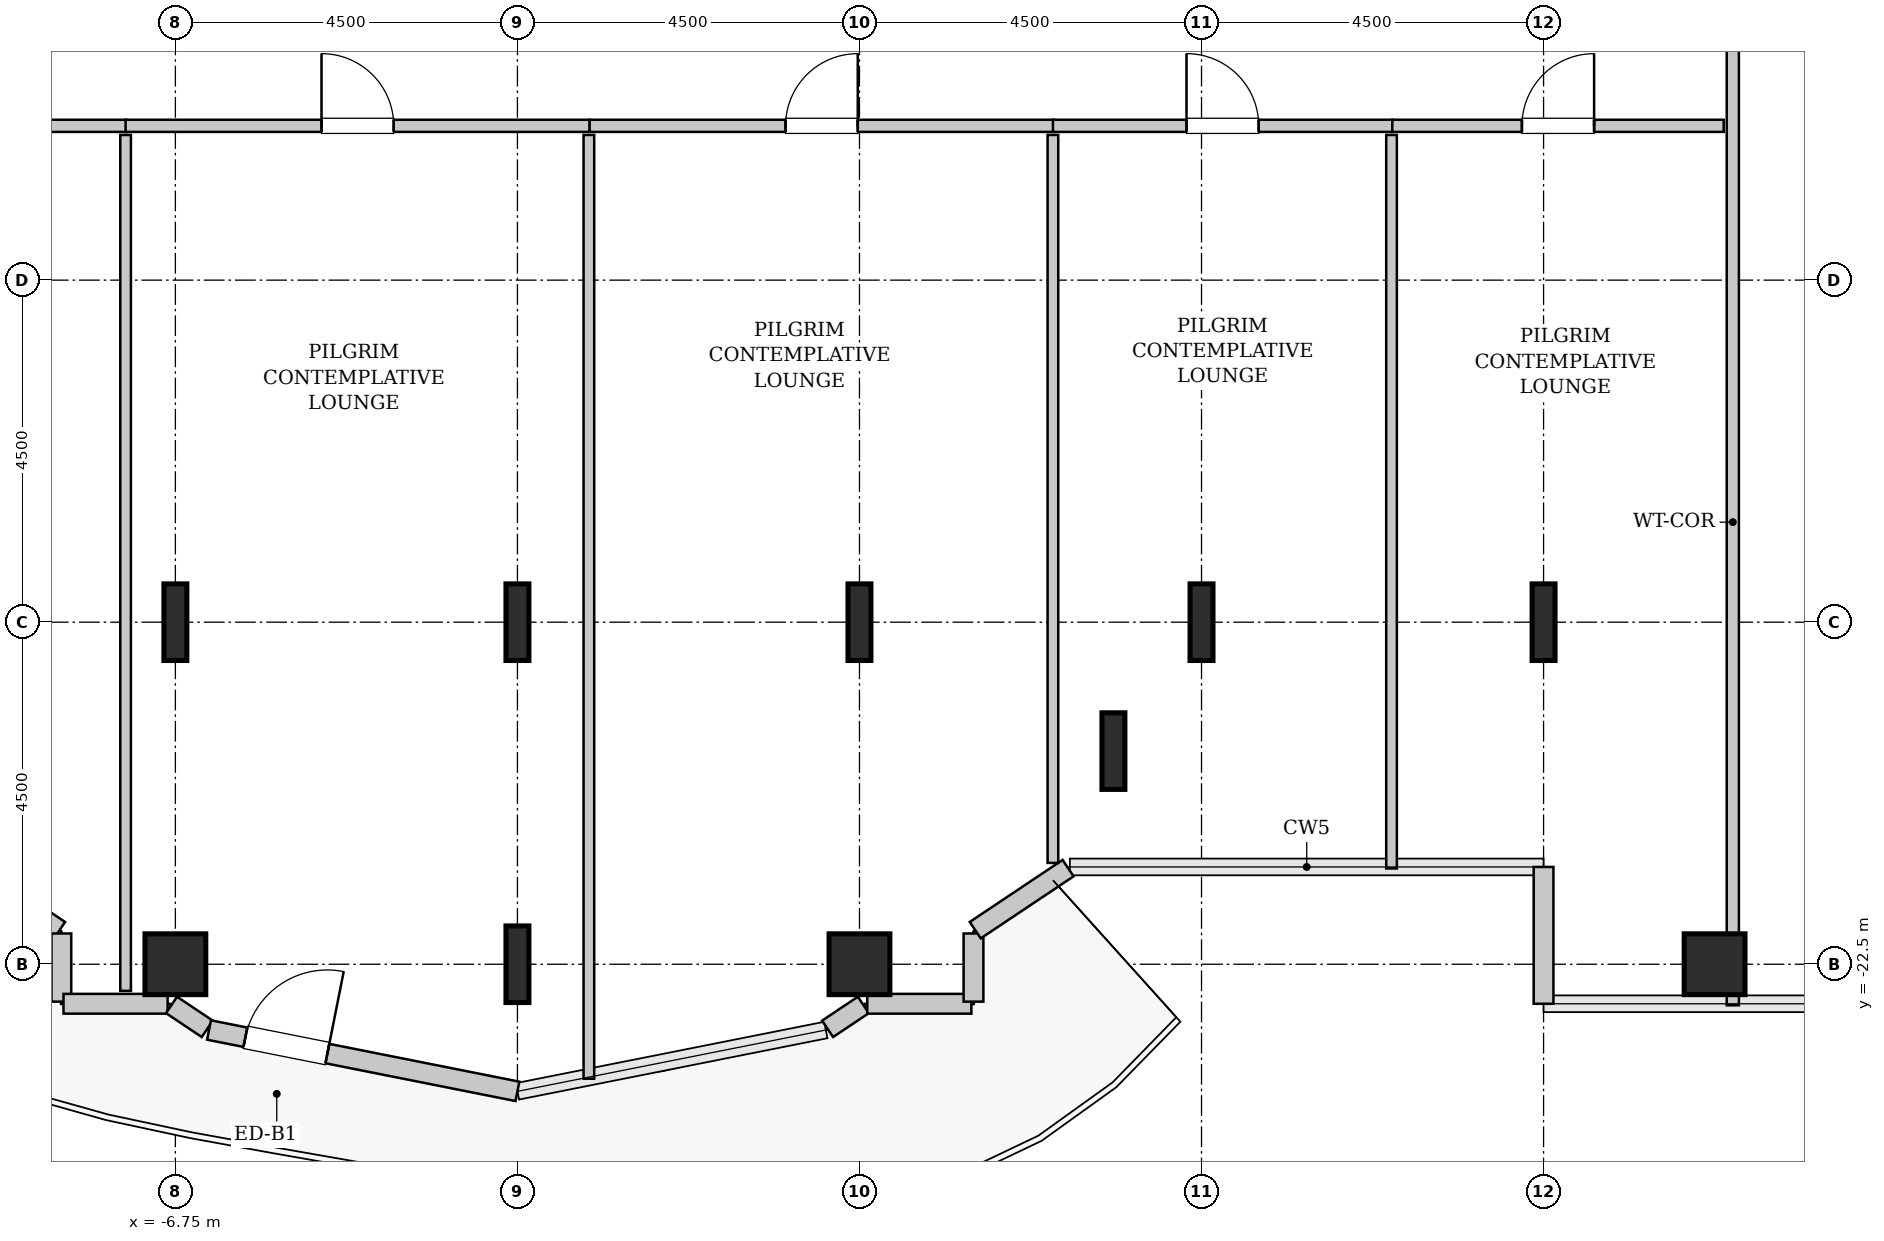
"""IFC4 building model, lengths in metres.
Left out: names, types, materials, properties, quantities, classifications, styles, units other than length and angle.
Written with IfcOpenShell. Run it as: python <this file> out.ifc"""

import sys

from ifc_helpers import new_model, si_unit, direction, frame, frame_2d, origin, origin_2d, place, context, subcontext, project, spatial, rectangle, hollow_rectangle, i_section, extrude, source, transform, mapped, element, fill, save


model = new_model("IFC4")
c1 = context("Model", 3, precision=1e-05, world=origin(), true_north=direction((0.0, 1.0)))
c2 = subcontext(c1, "Body", "Model", "MODEL_VIEW")
j1 = project(units=[si_unit("LENGTHUNIT", "METRE"), si_unit("PLANEANGLEUNIT", "RADIAN")], contexts=[c1])
p1 = place(None, origin())
s1 = spatial("IfcSite", under=j1, at=p1, CompositionType="ELEMENT")
p2 = place(p1, origin())
s2 = spatial("IfcBuilding", under=s1, at=p2, CompositionType="ELEMENT")
p3 = place(p2, frame((0.0, 0.0, 125.0)))
s3 = spatial("IfcBuildingStorey", under=s2, at=p3, CompositionType="ELEMENT", Elevation=125.0)
m1 = source(origin(), c2, "Body", "SweptSolid", [
    extrude(hollow_rectangle(XDim=0.8, YDim=0.8, WallThickness=0.04, InnerFilletRadius=0.04, OuterFilletRadius=0.08, at=origin_2d()), origin(), (0.0, 0.0, 1.0), 3.8),
])
p4 = place(p3, frame((-6.75, -22.5, 0.0), z_axis=(0.0, 0.0, 1.0), x_axis=(1.0, 0.0, 0.0)))
e1 = element("IfcColumn", 1, at=p4, inside=s3, PredefinedType="COLUMN", context=c2, shape_type="MappedRepresentation", body=[
    mapped(m1, transform((0.0, 0.0, 0.0), x_axis=(1.0, 0.0, 0.0), y_axis=(0.0, 1.0, 0.0), z_axis=(0.0, 0.0, 1.0), scale=1.0)),
])
m2 = source(origin(), c2, "Body", "SweptSolid", [
    extrude(i_section(OverallWidth=0.302, OverallDepth=1.008, WebThickness=0.021, FlangeThickness=0.04, FilletRadius=0.03, at=origin_2d()), origin(), (0.0, 0.0, 1.0), 3.8),
])
for number, where, z_axis, x_axis in (
    (2, (-6.75, -18.0, 0.0), (0.0, 0.0, 1.0), (1.0, 0.0, 0.0)),
    (3, (-2.25, -22.5, 0.0), (0.0, 0.0, 1.0), (1.0, 0.0, 0.0)),
    (4, (-2.25, -18.0, 0.0), (0.0, 0.0, 1.0), (1.0, 0.0, 0.0)),
):
    element("IfcColumn", number, at=place(p3, frame(where, z_axis=z_axis, x_axis=x_axis)), inside=s3, PredefinedType="COLUMN", context=c2, shape_type="MappedRepresentation", body=[
        mapped(m2, transform((0.0, 0.0, 0.0), x_axis=(1.0, 0.0, 0.0), y_axis=(0.0, 1.0, 0.0), z_axis=(0.0, 0.0, 1.0), scale=1.0)),
    ])
p5 = place(p3, frame((2.25, -22.5, 0.0), z_axis=(0.0, 0.0, 1.0), x_axis=(1.0, 0.0, 0.0)))
e5 = element("IfcColumn", 5, at=p5, inside=s3, PredefinedType="COLUMN", context=c2, shape_type="MappedRepresentation", body=[
    mapped(m1, transform((0.0, 0.0, 0.0), x_axis=(1.0, 0.0, 0.0), y_axis=(0.0, 1.0, 0.0), z_axis=(0.0, 0.0, 1.0), scale=1.0)),
])
for number, where, z_axis, x_axis in (
    (6, (2.25, -18.0, 0.0), (0.0, 0.0, 1.0), (1.0, 0.0, 0.0)),
    (7, (5.591, -19.696, 0.0), (0.0, 0.0, 1.0), (1.0, 0.0, 0.0)),
    (8, (6.75, -18.0, 0.0), (0.0, 0.0, 1.0), (1.0, 0.0, 0.0)),
    (9, (11.25, -18.0, 0.0), (0.0, 0.0, 1.0), (1.0, 0.0, 0.0)),
):
    element("IfcColumn", number, at=place(p3, frame(where, z_axis=z_axis, x_axis=x_axis)), inside=s3, PredefinedType="COLUMN", context=c2, shape_type="MappedRepresentation", body=[
        mapped(m2, transform((0.0, 0.0, 0.0), x_axis=(1.0, 0.0, 0.0), y_axis=(0.0, 1.0, 0.0), z_axis=(0.0, 0.0, 1.0), scale=1.0)),
    ])
p6 = place(p3, frame((13.5, -22.5, 0.0), z_axis=(0.0, 0.0, 1.0), x_axis=(1.0, 0.0, 0.0)))
e10 = element("IfcColumn", 10, at=p6, inside=s3, PredefinedType="COLUMN", context=c2, shape_type="MappedRepresentation", body=[
    mapped(m1, transform((0.0, 0.0, 0.0), x_axis=(1.0, 0.0, 0.0), y_axis=(0.0, 1.0, 0.0), z_axis=(0.0, 0.0, 1.0), scale=1.0)),
])
m3 = source(origin(), c2, "Body", "SweptSolid", [
    extrude(rectangle(XDim=1.8, YDim=0.26, at=frame_2d((0.9, 0.0))), origin(), (0.0, 0.0, 1.0), 3.55),
])
p7 = place(p3, frame((11.25, -21.22, 0.0), z_axis=(0.0, 0.0, 1.0), x_axis=(0.0, -1.0, 0.0)))
e11 = element("IfcWall", 11, at=p7, inside=s3, PredefinedType="SOLIDWALL", context=c2, shape_type="MappedRepresentation", body=[
    mapped(m3, transform((0.0, 0.0, 0.0), x_axis=(1.0, 0.0, 0.0), y_axis=(0.0, 1.0, 0.0), z_axis=(0.0, 0.0, 1.0), scale=1.0)),
])
m4 = source(origin(), c2, "Body", "SweptSolid", [
    extrude(rectangle(XDim=1.469, YDim=0.26, at=frame_2d((0.734, 0.0))), origin(), (0.0, 0.0, 1.0), 3.55),
])
p8 = place(p3, frame((-9.495, -21.236, 0.0), z_axis=(0.0, 0.0, 1.0), x_axis=(0.831461760506, -0.555581983884, 0.0)))
e12 = element("IfcWall", 12, at=p8, inside=s3, PredefinedType="SOLIDWALL", context=c2, shape_type="MappedRepresentation", body=[
    mapped(m4, transform((0.0, 0.0, 0.0), x_axis=(1.0, 0.0, 0.0), y_axis=(0.0, 1.0, 0.0), z_axis=(0.0, 0.0, 1.0), scale=1.0)),
])
m5 = source(origin(), c2, "Body", "SweptSolid", [
    extrude(rectangle(XDim=0.897, YDim=0.26, at=frame_2d((0.448, 0.0))), origin(), (0.0, 0.0, 1.0), 3.55),
])
p9 = place(p3, frame((-8.25, -22.095, 0.0), z_axis=(0.0, 0.0, 1.0), x_axis=(0.0, -1.0, 0.0)))
e13 = element("IfcWall", 13, at=p9, inside=s3, PredefinedType="SOLIDWALL", context=c2, shape_type="MappedRepresentation", body=[
    mapped(m5, transform((0.0, 0.0, 0.0), x_axis=(1.0, 0.0, 0.0), y_axis=(0.0, 1.0, 0.0), z_axis=(0.0, 0.0, 1.0), scale=1.0)),
])
m6 = source(origin(), c2, "Body", "SweptSolid", [
    extrude(rectangle(XDim=1.37, YDim=0.26, at=frame_2d((0.685, 0.0))), origin(), (0.0, 0.0, 1.0), 3.55),
])
p10 = place(p3, frame((-8.222, -23.02, 0.0), z_axis=(0.0, 0.0, 1.0), x_axis=(1.0, 0.0, 0.0)))
e14 = element("IfcWall", 14, at=p10, inside=s3, PredefinedType="SOLIDWALL", context=c2, shape_type="MappedRepresentation", body=[
    mapped(m6, transform((0.0, 0.0, 0.0), x_axis=(1.0, 0.0, 0.0), y_axis=(0.0, 1.0, 0.0), z_axis=(0.0, 0.0, 1.0), scale=1.0)),
])
m7 = source(origin(), c2, "Body", "SweptSolid", [
    extrude(rectangle(XDim=0.565, YDim=0.26, at=frame_2d((0.283, 0.0))), origin(), (0.0, 0.0, 1.0), 3.55),
])
p11 = place(p3, frame((-6.801, -23.036, 0.0), z_axis=(0.0, 0.0, 1.0), x_axis=(0.831651492666, -0.555297933317, 0.0)))
e15 = element("IfcWall", 15, at=p11, inside=s3, PredefinedType="SOLIDWALL", context=c2, shape_type="MappedRepresentation", body=[
    mapped(m7, transform((0.0, 0.0, 0.0), x_axis=(1.0, 0.0, 0.0), y_axis=(0.0, 1.0, 0.0), z_axis=(0.0, 0.0, 1.0), scale=1.0)),
])
m8 = source(origin(), c2, "Body", "SweptSolid", [
    extrude(rectangle(XDim=4.137, YDim=0.26, at=frame_2d((2.068, 0.0))), origin(), (0.0, 0.0, 1.0), 3.55),
])
p12 = place(p3, frame((-6.307, -23.365, 0.0), z_axis=(0.0, 0.0, 1.0), x_axis=(0.980782170794, -0.195105954428, 0.0)))
e16 = element("IfcWall", 16, at=p12, inside=s3, PredefinedType="SOLIDWALL", context=c2, shape_type="MappedRepresentation", body=[
    mapped(m8, transform((0.0, 0.0, 0.0), x_axis=(1.0, 0.0, 0.0), y_axis=(0.0, 1.0, 0.0), z_axis=(0.0, 0.0, 1.0), scale=1.0)),
])
p13 = place(p12, frame((0.488, 0.0, 0.0)))
e17 = element("IfcOpeningElement", 17, at=p13, cuts=e16, PredefinedType="OPENING", context=c2, shape_type="SweptSolid", body=[
    extrude(rectangle(XDim=1.1, YDim=2.2, at=frame_2d((0.55, 1.1))), frame((0.0, 0.14, 0.0), z_axis=(0.0, -1.0, 0.0), x_axis=(1.0, 0.0, 0.0)), (0.0, 0.0, 1.0), 0.28),
])
p14 = place(p3, frame((1.831, -23.35, 0.0), z_axis=(0.0, 0.0, 1.0), x_axis=(0.831651492666, 0.555297933317, 0.0)))
e18 = element("IfcWall", 18, at=p14, inside=s3, PredefinedType="SOLIDWALL", context=c2, shape_type="MappedRepresentation", body=[
    mapped(m7, transform((0.0, 0.0, 0.0), x_axis=(1.0, 0.0, 0.0), y_axis=(0.0, 1.0, 0.0), z_axis=(0.0, 0.0, 1.0), scale=1.0)),
])
p15 = place(p3, frame((2.352, -23.02, 0.0), z_axis=(0.0, 0.0, 1.0), x_axis=(1.0, 0.0, 0.0)))
e19 = element("IfcWall", 19, at=p15, inside=s3, PredefinedType="SOLIDWALL", context=c2, shape_type="MappedRepresentation", body=[
    mapped(m6, transform((0.0, 0.0, 0.0), x_axis=(1.0, 0.0, 0.0), y_axis=(0.0, 1.0, 0.0), z_axis=(0.0, 0.0, 1.0), scale=1.0)),
])
p16 = place(p3, frame((3.75, -22.992, 0.0), z_axis=(0.0, 0.0, 1.0), x_axis=(0.0, 1.0, 0.0)))
e20 = element("IfcWall", 20, at=p16, inside=s3, PredefinedType="SOLIDWALL", context=c2, shape_type="MappedRepresentation", body=[
    mapped(m5, transform((0.0, 0.0, 0.0), x_axis=(1.0, 0.0, 0.0), y_axis=(0.0, 1.0, 0.0), z_axis=(0.0, 0.0, 1.0), scale=1.0)),
])
p17 = place(p3, frame((3.773, -22.052, 0.0), z_axis=(0.0, 0.0, 1.0), x_axis=(0.831461760506, 0.555581983884, 0.0)))
e21 = element("IfcWall", 21, at=p17, inside=s3, PredefinedType="SOLIDWALL", context=c2, shape_type="MappedRepresentation", body=[
    mapped(m4, transform((0.0, 0.0, 0.0), x_axis=(1.0, 0.0, 0.0), y_axis=(0.0, 1.0, 0.0), z_axis=(0.0, 0.0, 1.0), scale=1.0)),
])
m9 = source(origin(), c2, "Body", "SweptSolid", [
    extrude(rectangle(XDim=14.745, YDim=0.16, at=frame_2d((7.373, 0.0))), origin(), (0.0, 0.0, 1.0), 3.535),
])
p18 = place(p3, frame((13.74, -23.04, 0.0), z_axis=(0.0, 0.0, 1.0), x_axis=(0.0, 1.0, 0.0)))
e22 = element("IfcWall", 22, at=p18, inside=s3, PredefinedType="PARTITIONING", context=c2, shape_type="MappedRepresentation", body=[
    mapped(m9, transform((0.0, 0.0, 0.0), x_axis=(1.0, 0.0, 0.0), y_axis=(0.0, 1.0, 0.0), z_axis=(0.0, 0.0, 1.0), scale=1.0)),
])
p19 = place(p18, frame((12.663, 0.0, 0.0)))
e23 = element("IfcOpeningElement", 23, at=p19, cuts=e22, PredefinedType="OPENING", context=c2, shape_type="SweptSolid", body=[
    extrude(rectangle(XDim=0.95, YDim=2.1, at=frame_2d((0.475, 1.05))), frame((0.0, 0.09, 0.0), z_axis=(0.0, -1.0, 0.0), x_axis=(1.0, 0.0, 0.0)), (0.0, 0.0, 1.0), 0.18),
])
m10 = source(origin(), c2, "Body", "SweptSolid", [
    extrude(rectangle(XDim=6.225, YDim=0.16, at=frame_2d((3.113, 0.0))), origin(), (0.0, 0.0, 1.0), 3.535),
])
p20 = place(p3, frame((-13.62, -11.47, 0.0), z_axis=(0.0, 0.0, 1.0), x_axis=(1.0, 0.0, 0.0)))
e24 = element("IfcWall", 24, at=p20, inside=s3, PredefinedType="PARTITIONING", context=c2, shape_type="MappedRepresentation", body=[
    mapped(m10, transform((0.0, 0.0, 0.0), x_axis=(1.0, 0.0, 0.0), y_axis=(0.0, 1.0, 0.0), z_axis=(0.0, 0.0, 1.0), scale=1.0)),
])
p21 = place(p20, frame((2.637, 0.0, 0.0)))
e25 = element("IfcOpeningElement", 25, at=p21, cuts=e24, PredefinedType="OPENING", context=c2, shape_type="SweptSolid", body=[
    extrude(rectangle(XDim=0.95, YDim=2.1, at=frame_2d((0.475, 1.05))), frame((0.0, 0.09, 0.0), z_axis=(0.0, -1.0, 0.0), x_axis=(1.0, 0.0, 0.0)), (0.0, 0.0, 1.0), 0.18),
])
m11 = source(origin(), c2, "Body", "SweptSolid", [
    extrude(rectangle(XDim=11.26, YDim=0.14, at=frame_2d((5.63, 0.0))), origin(), (0.0, 0.0, 1.0), 3.535),
])
p22 = place(p3, frame((-7.405, -22.85, 0.0), z_axis=(0.0, 0.0, 1.0), x_axis=(0.0, 1.0, 0.0)))
e26 = element("IfcWall", 26, at=p22, inside=s3, PredefinedType="PARTITIONING", context=c2, shape_type="MappedRepresentation", body=[
    mapped(m11, transform((0.0, 0.0, 0.0), x_axis=(1.0, 0.0, 0.0), y_axis=(0.0, 1.0, 0.0), z_axis=(0.0, 0.0, 1.0), scale=1.0)),
])
m12 = source(origin(), c2, "Body", "SweptSolid", [
    extrude(rectangle(XDim=6.105, YDim=0.16, at=frame_2d((3.052, 0.0))), origin(), (0.0, 0.0, 1.0), 3.535),
])
p23 = place(p3, frame((-7.405, -11.47, 0.0), z_axis=(0.0, 0.0, 1.0), x_axis=(1.0, 0.0, 0.0)))
e27 = element("IfcWall", 27, at=p23, inside=s3, PredefinedType="PARTITIONING", context=c2, shape_type="MappedRepresentation", body=[
    mapped(m12, transform((0.0, 0.0, 0.0), x_axis=(1.0, 0.0, 0.0), y_axis=(0.0, 1.0, 0.0), z_axis=(0.0, 0.0, 1.0), scale=1.0)),
])
p24 = place(p23, frame((2.577, 0.0, 0.0)))
e28 = element("IfcOpeningElement", 28, at=p24, cuts=e27, PredefinedType="OPENING", context=c2, shape_type="SweptSolid", body=[
    extrude(rectangle(XDim=0.95, YDim=2.1, at=frame_2d((0.475, 1.05))), frame((0.0, 0.09, 0.0), z_axis=(0.0, -1.0, 0.0), x_axis=(1.0, 0.0, 0.0)), (0.0, 0.0, 1.0), 0.18),
])
m13 = source(origin(), c2, "Body", "SweptSolid", [
    extrude(rectangle(XDim=12.416, YDim=0.14, at=frame_2d((6.208, 0.0))), origin(), (0.0, 0.0, 1.0), 3.535),
])
p25 = place(p3, frame((-1.31, -24.006, 0.0), z_axis=(0.0, 0.0, 1.0), x_axis=(0.0, 1.0, 0.0)))
e29 = element("IfcWall", 29, at=p25, inside=s3, PredefinedType="PARTITIONING", context=c2, shape_type="MappedRepresentation", body=[
    mapped(m13, transform((0.0, 0.0, 0.0), x_axis=(1.0, 0.0, 0.0), y_axis=(0.0, 1.0, 0.0), z_axis=(0.0, 0.0, 1.0), scale=1.0)),
])
p26 = place(p3, frame((-1.3, -11.47, 0.0), z_axis=(0.0, 0.0, 1.0), x_axis=(1.0, 0.0, 0.0)))
e30 = element("IfcWall", 30, at=p26, inside=s3, PredefinedType="PARTITIONING", context=c2, shape_type="MappedRepresentation", body=[
    mapped(m12, transform((0.0, 0.0, 0.0), x_axis=(1.0, 0.0, 0.0), y_axis=(0.0, 1.0, 0.0), z_axis=(0.0, 0.0, 1.0), scale=1.0)),
])
p27 = place(p26, frame((2.577, 0.0, 0.0)))
e31 = element("IfcOpeningElement", 31, at=p27, cuts=e30, PredefinedType="OPENING", context=c2, shape_type="SweptSolid", body=[
    extrude(rectangle(XDim=0.95, YDim=2.1, at=frame_2d((0.475, 1.05))), frame((0.0, 0.09, 0.0), z_axis=(0.0, -1.0, 0.0), x_axis=(1.0, 0.0, 0.0)), (0.0, 0.0, 1.0), 0.18),
])
m14 = source(origin(), c2, "Body", "SweptSolid", [
    extrude(rectangle(XDim=9.577, YDim=0.14, at=frame_2d((4.789, 0.0))), origin(), (0.0, 0.0, 1.0), 3.535),
])
p28 = place(p3, frame((4.795, -21.167, 0.0), z_axis=(0.0, 0.0, 1.0), x_axis=(0.0, 1.0, 0.0)))
e32 = element("IfcWall", 32, at=p28, inside=s3, PredefinedType="PARTITIONING", context=c2, shape_type="MappedRepresentation", body=[
    mapped(m14, transform((0.0, 0.0, 0.0), x_axis=(1.0, 0.0, 0.0), y_axis=(0.0, 1.0, 0.0), z_axis=(0.0, 0.0, 1.0), scale=1.0)),
])
m15 = source(origin(), c2, "Body", "SweptSolid", [
    extrude(rectangle(XDim=4.465, YDim=0.16, at=frame_2d((2.232, 0.0))), origin(), (0.0, 0.0, 1.0), 3.535),
])
p29 = place(p3, frame((4.795, -11.47, 0.0), z_axis=(0.0, 0.0, 1.0), x_axis=(1.0, 0.0, 0.0)))
e33 = element("IfcWall", 33, at=p29, inside=s3, PredefinedType="PARTITIONING", context=c2, shape_type="MappedRepresentation", body=[
    mapped(m15, transform((0.0, 0.0, 0.0), x_axis=(1.0, 0.0, 0.0), y_axis=(0.0, 1.0, 0.0), z_axis=(0.0, 0.0, 1.0), scale=1.0)),
])
p30 = place(p29, frame((1.758, 0.0, 0.0)))
e34 = element("IfcOpeningElement", 34, at=p30, cuts=e33, PredefinedType="OPENING", context=c2, shape_type="SweptSolid", body=[
    extrude(rectangle(XDim=0.95, YDim=2.1, at=frame_2d((0.475, 1.05))), frame((0.0, 0.09, 0.0), z_axis=(0.0, -1.0, 0.0), x_axis=(1.0, 0.0, 0.0)), (0.0, 0.0, 1.0), 0.18),
])
m16 = source(origin(), c2, "Body", "SweptSolid", [
    extrude(rectangle(XDim=9.65, YDim=0.14, at=frame_2d((4.825, 0.0))), origin(), (0.0, 0.0, 1.0), 3.535),
])
p31 = place(p3, frame((9.25, -21.24, 0.0), z_axis=(0.0, 0.0, 1.0), x_axis=(0.0, 1.0, 0.0)))
e35 = element("IfcWall", 35, at=p31, inside=s3, PredefinedType="PARTITIONING", context=c2, shape_type="MappedRepresentation", body=[
    mapped(m16, transform((0.0, 0.0, 0.0), x_axis=(1.0, 0.0, 0.0), y_axis=(0.0, 1.0, 0.0), z_axis=(0.0, 0.0, 1.0), scale=1.0)),
])
m17 = source(origin(), c2, "Body", "SweptSolid", [
    extrude(rectangle(XDim=4.36, YDim=0.16, at=frame_2d((2.18, 0.0))), origin(), (0.0, 0.0, 1.0), 3.535),
])
p32 = place(p3, frame((9.26, -11.47, 0.0), z_axis=(0.0, 0.0, 1.0), x_axis=(1.0, 0.0, 0.0)))
e36 = element("IfcWall", 36, at=p32, inside=s3, PredefinedType="PARTITIONING", context=c2, shape_type="MappedRepresentation", body=[
    mapped(m17, transform((0.0, 0.0, 0.0), x_axis=(1.0, 0.0, 0.0), y_axis=(0.0, 1.0, 0.0), z_axis=(0.0, 0.0, 1.0), scale=1.0)),
])
p33 = place(p32, frame((1.705, 0.0, 0.0)))
e37 = element("IfcOpeningElement", 37, at=p33, cuts=e36, PredefinedType="OPENING", context=c2, shape_type="SweptSolid", body=[
    extrude(rectangle(XDim=0.95, YDim=2.1, at=frame_2d((0.475, 1.05))), frame((0.0, 0.09, 0.0), z_axis=(0.0, -1.0, 0.0), x_axis=(1.0, 0.0, 0.0)), (0.0, 0.0, 1.0), 0.18),
])
m18 = source(origin(), c2, "Body", "SweptSolid", [
    extrude(rectangle(XDim=1.1, YDim=2.2, at=frame_2d((0.55, 1.1))), frame((0.0, 0.025, 0.0), z_axis=(0.0, -1.0, 0.0), x_axis=(1.0, 0.0, 0.0)), (0.0, 0.0, 1.0), 0.05),
])
p34 = place(p13, origin())
e38 = element("IfcDoor", 38, at=p34, inside=s3, OperationType="SINGLE_SWING_RIGHT", PredefinedType="DOOR", context=c2, shape_type="MappedRepresentation", body=[
    mapped(m18, transform((0.0, 0.0, 0.0), x_axis=(1.0, 0.0, 0.0), y_axis=(0.0, 1.0, 0.0), z_axis=(0.0, 0.0, 1.0), scale=1.0)),
])
fill(e17, e38)
m19 = source(origin(), c2, "Body", "SweptSolid", [
    extrude(rectangle(XDim=0.95, YDim=2.1, at=frame_2d((0.475, 1.05))), frame((0.0, 0.025, 0.0), z_axis=(0.0, -1.0, 0.0), x_axis=(1.0, 0.0, 0.0)), (0.0, 0.0, 1.0), 0.05),
])
p35 = place(p24, origin())
e39 = element("IfcDoor", 39, at=p35, inside=s3, OperationType="SINGLE_SWING_LEFT", PredefinedType="DOOR", context=c2, shape_type="MappedRepresentation", body=[
    mapped(m19, transform((0.0, 0.0, 0.0), x_axis=(1.0, 0.0, 0.0), y_axis=(0.0, 1.0, 0.0), z_axis=(0.0, 0.0, 1.0), scale=1.0)),
])
fill(e28, e39)
p36 = place(p27, origin())
e40 = element("IfcDoor", 40, at=p36, inside=s3, OperationType="SINGLE_SWING_RIGHT", PredefinedType="DOOR", context=c2, shape_type="MappedRepresentation", body=[
    mapped(m19, transform((0.0, 0.0, 0.0), x_axis=(1.0, 0.0, 0.0), y_axis=(0.0, 1.0, 0.0), z_axis=(0.0, 0.0, 1.0), scale=1.0)),
])
fill(e31, e40)
p37 = place(p30, origin())
e41 = element("IfcDoor", 41, at=p37, inside=s3, OperationType="SINGLE_SWING_LEFT", PredefinedType="DOOR", context=c2, shape_type="MappedRepresentation", body=[
    mapped(m19, transform((0.0, 0.0, 0.0), x_axis=(1.0, 0.0, 0.0), y_axis=(0.0, 1.0, 0.0), z_axis=(0.0, 0.0, 1.0), scale=1.0)),
])
fill(e34, e41)
p38 = place(p33, origin())
e42 = element("IfcDoor", 42, at=p38, inside=s3, OperationType="SINGLE_SWING_RIGHT", PredefinedType="DOOR", context=c2, shape_type="MappedRepresentation", body=[
    mapped(m19, transform((0.0, 0.0, 0.0), x_axis=(1.0, 0.0, 0.0), y_axis=(0.0, 1.0, 0.0), z_axis=(0.0, 0.0, 1.0), scale=1.0)),
])
fill(e37, e42)
save(model, sys.argv[1])
